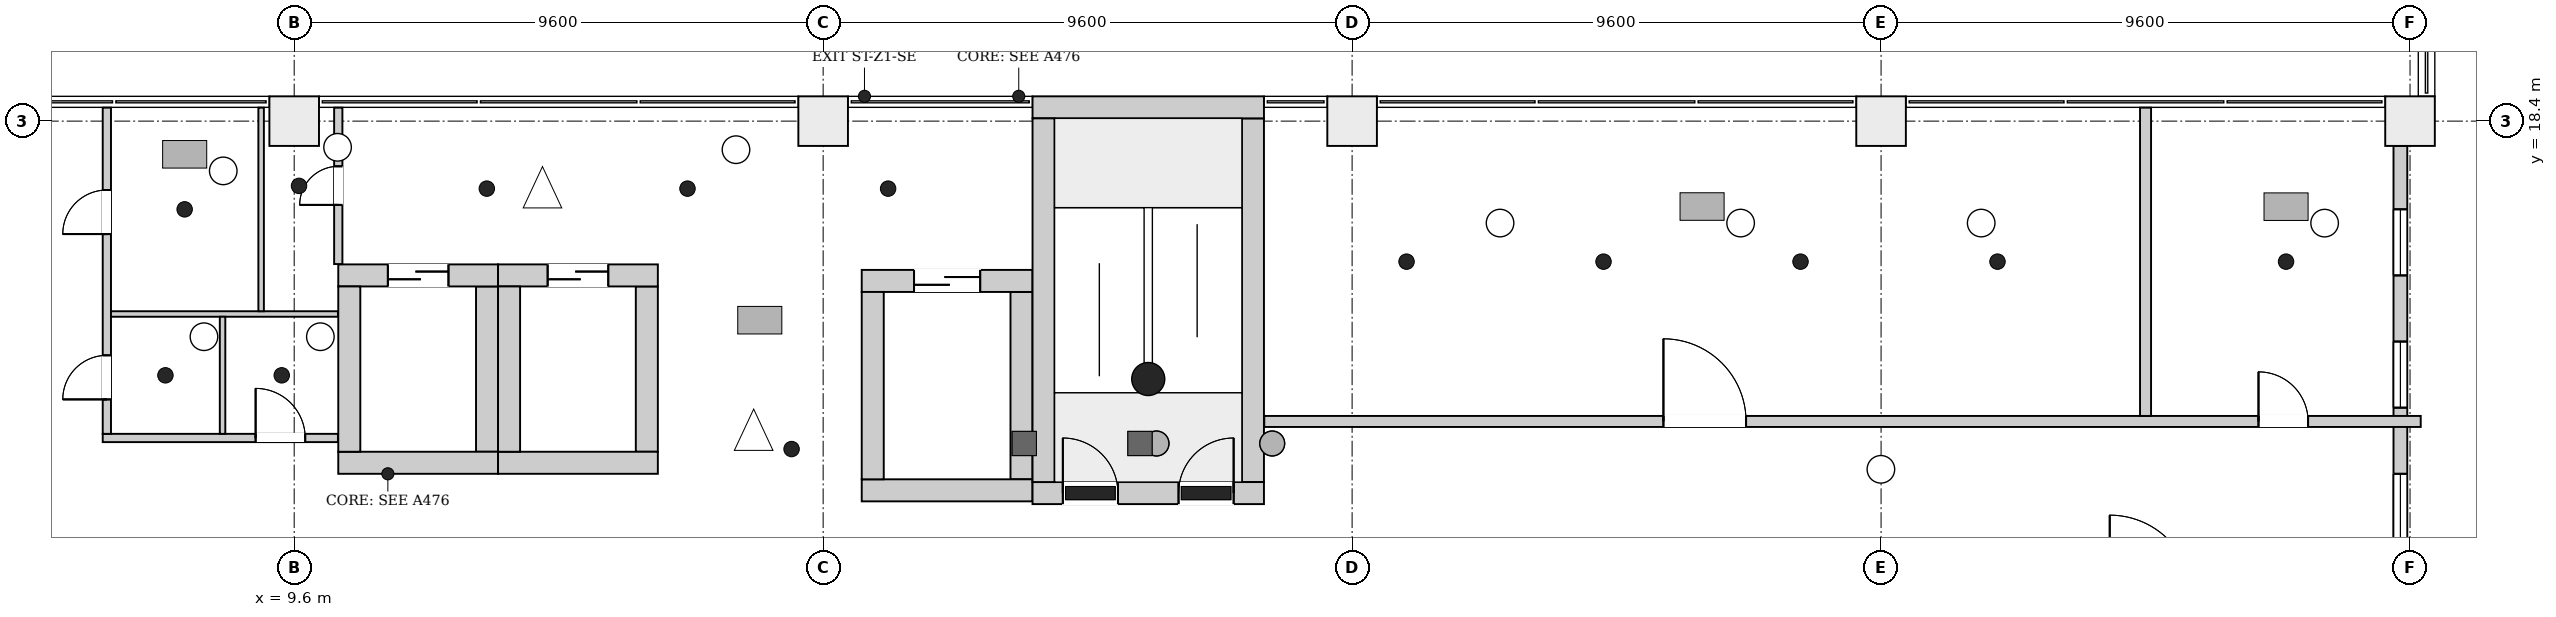
"""IFC4 building model, lengths in metres.
Left out: names, types, materials, properties, quantities, classifications, styles, units other than length and angle.
Written with IfcOpenShell. Run it as: python <this file> out.ifc"""

import sys

from ifc_helpers import new_model, si_unit, direction, frame, frame_2d, origin, origin_2d, place, context, subcontext, project, spatial, rectangle, extrude, element, fill, save


model = new_model("IFC4")
c1 = context("Model", 3, precision=1e-05, world=origin(), true_north=direction((0.0, 1.0)))
c2 = subcontext(c1, "Body", "Model", "MODEL_VIEW")
j1 = project(units=[si_unit("LENGTHUNIT", "METRE"), si_unit("PLANEANGLEUNIT", "RADIAN")], contexts=[c1])
p1 = place(None, origin())
s1 = spatial("IfcSite", under=j1, at=p1, CompositionType="ELEMENT")
p2 = place(p1, origin())
s2 = spatial("IfcBuilding", under=s1, at=p2, CompositionType="ELEMENT")
p3 = place(p2, frame((0.0, 0.0, 52.9)))
s3 = spatial("IfcBuildingStorey", under=s2, at=p3, CompositionType="ELEMENT", Elevation=52.9)
p4 = place(p3, frame((23.0, 11.65, 0.0), z_axis=(0.0, 0.0, 1.0), x_axis=(1.0, 0.0, 0.0)))
e1 = element("IfcWall", 1, at=p4, inside=s3, PredefinedType="SHEAR", context=c2, shape_type="SweptSolid", body=[
    extrude(rectangle(XDim=4.2, YDim=0.4, at=frame_2d((2.1, 0.0))), origin(), (0.0, 0.0, 1.0), 4.2),
])
p5 = place(p4, frame((0.55, 0.0, 0.0)))
e2 = element("IfcOpeningElement", 2, at=p5, cuts=e1, PredefinedType="OPENING", context=c2, shape_type="SweptSolid", body=[
    extrude(rectangle(XDim=1.0, YDim=2.1, at=frame_2d((0.5, 1.05))), frame((0.0, 0.21, 0.0), z_axis=(0.0, -1.0, 0.0), x_axis=(1.0, 0.0, 0.0)), (0.0, 0.0, 1.0), 0.42),
])
p6 = place(p4, frame((2.65, 0.0, 0.0)))
e3 = element("IfcOpeningElement", 3, at=p6, cuts=e1, PredefinedType="OPENING", context=c2, shape_type="SweptSolid", body=[
    extrude(rectangle(XDim=1.0, YDim=2.1, at=frame_2d((0.5, 1.05))), frame((0.0, 0.21, 0.0), z_axis=(0.0, -1.0, 0.0), x_axis=(1.0, 0.0, 0.0)), (0.0, 0.0, 1.0), 0.42),
])
p7 = place(p3, frame((23.0, 18.65, 0.0), z_axis=(0.0, 0.0, 1.0), x_axis=(1.0, 0.0, 0.0)))
e4 = element("IfcWall", 4, at=p7, inside=s3, PredefinedType="SHEAR", context=c2, shape_type="SweptSolid", body=[
    extrude(rectangle(XDim=4.2, YDim=0.4, at=frame_2d((2.1, 0.0))), origin(), (0.0, 0.0, 1.0), 4.2),
])
for number, where, z_axis, x_axis in (
    (5, (23.2, 11.85, 0.0), (0.0, 0.0, 1.0), (0.0, 1.0, 0.0)),
    (6, (27.0, 11.85, 0.0), (0.0, 0.0, 1.0), (0.0, 1.0, 0.0)),
):
    element("IfcWall", number, at=place(p3, frame(where, z_axis=z_axis, x_axis=x_axis)), inside=s3, PredefinedType="SHEAR", context=c2, shape_type="SweptSolid", body=[
        extrude(rectangle(XDim=6.6, YDim=0.4, at=frame_2d((3.3, 0.0))), origin(), (0.0, 0.0, 1.0), 4.2),
    ])
p8 = place(p3, frame((10.4, 12.2, 0.0), z_axis=(0.0, 0.0, 1.0), x_axis=(1.0, 0.0, 0.0)))
e7 = element("IfcWall", 7, at=p8, inside=s3, PredefinedType="SHEAR", context=c2, shape_type="SweptSolid", body=[
    extrude(rectangle(XDim=2.9, YDim=0.4, at=frame_2d((1.45, 0.0))), origin(), (0.0, 0.0, 1.0), 4.2),
])
p9 = place(p3, frame((10.4, 15.6, 0.0), z_axis=(0.0, 0.0, 1.0), x_axis=(1.0, 0.0, 0.0)))
e8 = element("IfcWall", 8, at=p9, inside=s3, PredefinedType="SHEAR", context=c2, shape_type="SweptSolid", body=[
    extrude(rectangle(XDim=2.9, YDim=0.4, at=frame_2d((1.45, 0.0))), origin(), (0.0, 0.0, 1.0), 4.2),
])
p10 = place(p9, frame((0.9, 0.0, 0.0)))
e9 = element("IfcOpeningElement", 9, at=p10, cuts=e8, PredefinedType="OPENING", context=c2, shape_type="SweptSolid", body=[
    extrude(rectangle(XDim=1.1, YDim=2.1, at=frame_2d((0.55, 1.05))), frame((0.0, 0.21, 0.0), z_axis=(0.0, -1.0, 0.0), x_axis=(1.0, 0.0, 0.0)), (0.0, 0.0, 1.0), 0.42),
])
for number, where, z_axis, x_axis in (
    (10, (10.6, 12.4, 0.0), (0.0, 0.0, 1.0), (0.0, 1.0, 0.0)),
    (11, (13.1, 12.4, 0.0), (0.0, 0.0, 1.0), (0.0, 1.0, 0.0)),
):
    element("IfcWall", number, at=place(p3, frame(where, z_axis=z_axis, x_axis=x_axis)), inside=s3, PredefinedType="SHEAR", context=c2, shape_type="SweptSolid", body=[
        extrude(rectangle(XDim=3.0, YDim=0.4, at=frame_2d((1.5, 0.0))), origin(), (0.0, 0.0, 1.0), 4.2),
    ])
p11 = place(p3, frame((13.3, 12.2, 0.0), z_axis=(0.0, 0.0, 1.0), x_axis=(1.0, 0.0, 0.0)))
e12 = element("IfcWall", 12, at=p11, inside=s3, PredefinedType="SHEAR", context=c2, shape_type="SweptSolid", body=[
    extrude(rectangle(XDim=2.9, YDim=0.4, at=frame_2d((1.45, 0.0))), origin(), (0.0, 0.0, 1.0), 4.2),
])
p12 = place(p3, frame((13.3, 15.6, 0.0), z_axis=(0.0, 0.0, 1.0), x_axis=(1.0, 0.0, 0.0)))
e13 = element("IfcWall", 13, at=p12, inside=s3, PredefinedType="SHEAR", context=c2, shape_type="SweptSolid", body=[
    extrude(rectangle(XDim=2.9, YDim=0.4, at=frame_2d((1.45, 0.0))), origin(), (0.0, 0.0, 1.0), 4.2),
])
p13 = place(p12, frame((0.9, 0.0, 0.0)))
e14 = element("IfcOpeningElement", 14, at=p13, cuts=e13, PredefinedType="OPENING", context=c2, shape_type="SweptSolid", body=[
    extrude(rectangle(XDim=1.1, YDim=2.1, at=frame_2d((0.55, 1.05))), frame((0.0, 0.21, 0.0), z_axis=(0.0, -1.0, 0.0), x_axis=(1.0, 0.0, 0.0)), (0.0, 0.0, 1.0), 0.42),
])
for number, where, z_axis, x_axis in (
    (15, (13.5, 12.4, 0.0), (0.0, 0.0, 1.0), (0.0, 1.0, 0.0)),
    (16, (16.0, 12.4, 0.0), (0.0, 0.0, 1.0), (0.0, 1.0, 0.0)),
):
    element("IfcWall", number, at=place(p3, frame(where, z_axis=z_axis, x_axis=x_axis)), inside=s3, PredefinedType="SHEAR", context=c2, shape_type="SweptSolid", body=[
        extrude(rectangle(XDim=3.0, YDim=0.4, at=frame_2d((1.5, 0.0))), origin(), (0.0, 0.0, 1.0), 4.2),
    ])
p14 = place(p3, frame((19.9, 11.7, 0.0), z_axis=(0.0, 0.0, 1.0), x_axis=(1.0, 0.0, 0.0)))
e17 = element("IfcWall", 17, at=p14, inside=s3, PredefinedType="SHEAR", context=c2, shape_type="SweptSolid", body=[
    extrude(rectangle(XDim=3.1, YDim=0.4, at=frame_2d((1.55, 0.0))), origin(), (0.0, 0.0, 1.0), 4.2),
])
p15 = place(p3, frame((19.9, 15.5, 0.0), z_axis=(0.0, 0.0, 1.0), x_axis=(1.0, 0.0, 0.0)))
e18 = element("IfcWall", 18, at=p15, inside=s3, PredefinedType="SHEAR", context=c2, shape_type="SweptSolid", body=[
    extrude(rectangle(XDim=3.1, YDim=0.4, at=frame_2d((1.55, 0.0))), origin(), (0.0, 0.0, 1.0), 4.2),
])
p16 = place(p15, frame((0.95, 0.0, 0.0)))
e19 = element("IfcOpeningElement", 19, at=p16, cuts=e18, PredefinedType="OPENING", context=c2, shape_type="SweptSolid", body=[
    extrude(rectangle(XDim=1.2, YDim=2.1, at=frame_2d((0.6, 1.05))), frame((0.0, 0.21, 0.0), z_axis=(0.0, -1.0, 0.0), x_axis=(1.0, 0.0, 0.0)), (0.0, 0.0, 1.0), 0.42),
])
for number, where, z_axis, x_axis in (
    (20, (20.1, 11.9, 0.0), (0.0, 0.0, 1.0), (0.0, 1.0, 0.0)),
    (21, (22.8, 11.9, 0.0), (0.0, 0.0, 1.0), (0.0, 1.0, 0.0)),
):
    element("IfcWall", number, at=place(p3, frame(where, z_axis=z_axis, x_axis=x_axis)), inside=s3, PredefinedType="SHEAR", context=c2, shape_type="SweptSolid", body=[
        extrude(rectangle(XDim=3.4, YDim=0.4, at=frame_2d((1.7, 0.0))), origin(), (0.0, 0.0, 1.0), 4.2),
    ])
for number, where, z_axis, x_axis in (
    (22, (9.6, 18.4, 0.0), (0.0, 0.0, 1.0), (1.0, 0.0, 0.0)),
    (23, (19.2, 18.4, 0.0), (0.0, 0.0, 1.0), (1.0, 0.0, 0.0)),
    (24, (28.8, 18.4, 0.0), (0.0, 0.0, 1.0), (1.0, 0.0, 0.0)),
    (25, (38.4, 18.4, 0.0), (0.0, 0.0, 1.0), (1.0, 0.0, 0.0)),
    (26, (48.0, 18.4, 0.0), (0.0, 0.0, 1.0), (1.0, 0.0, 0.0)),
):
    element("IfcColumn", number, at=place(p3, frame(where, z_axis=z_axis, x_axis=x_axis)), inside=s3, PredefinedType="COLUMN", context=c2, shape_type="SweptSolid", body=[
        extrude(rectangle(XDim=0.9, YDim=0.9, at=origin_2d()), origin(), (0.0, 0.0, 1.0), 4.2),
    ])
p17 = place(p3, frame((47.825, 9.65, 0.0), z_axis=(0.0, 0.0, 1.0), x_axis=(0.0, 1.0, 0.0)))
e27 = element("IfcWall", 27, at=p17, inside=s3, PredefinedType="ELEMENTEDWALL", context=c2, shape_type="SweptSolid", body=[
    extrude(rectangle(XDim=8.3, YDim=0.25, at=frame_2d((4.15, 0.0))), origin(), (0.0, 0.0, 1.0), 3.3),
])
p18 = place(p17, frame((1.15, 0.0, 0.6)))
e28 = element("IfcOpeningElement", 28, at=p18, cuts=e27, PredefinedType="OPENING", context=c2, shape_type="SweptSolid", body=[
    extrude(rectangle(XDim=1.2, YDim=2.6, at=frame_2d((0.6, 1.3))), frame((0.0, 0.135, 0.0), z_axis=(0.0, -1.0, 0.0), x_axis=(1.0, 0.0, 0.0)), (0.0, 0.0, 1.0), 0.27),
])
p19 = place(p17, frame((3.55, 0.0, 0.6)))
e29 = element("IfcOpeningElement", 29, at=p19, cuts=e27, PredefinedType="OPENING", context=c2, shape_type="SweptSolid", body=[
    extrude(rectangle(XDim=1.2, YDim=2.6, at=frame_2d((0.6, 1.3))), frame((0.0, 0.135, 0.0), z_axis=(0.0, -1.0, 0.0), x_axis=(1.0, 0.0, 0.0)), (0.0, 0.0, 1.0), 0.27),
])
p20 = place(p17, frame((5.95, 0.0, 0.6)))
e30 = element("IfcOpeningElement", 30, at=p20, cuts=e27, PredefinedType="OPENING", context=c2, shape_type="SweptSolid", body=[
    extrude(rectangle(XDim=1.2, YDim=2.6, at=frame_2d((0.6, 1.3))), frame((0.0, 0.135, 0.0), z_axis=(0.0, -1.0, 0.0), x_axis=(1.0, 0.0, 0.0)), (0.0, 0.0, 1.0), 0.27),
])
p21 = place(p3, frame((6.125, 12.65, 0.0), z_axis=(0.0, 0.0, 1.0), x_axis=(1.0, 0.0, 0.0)))
e31 = element("IfcWall", 31, at=p21, inside=s3, PredefinedType="PARTITIONING", context=c2, shape_type="SweptSolid", body=[
    extrude(rectangle(XDim=4.269, YDim=0.15, at=frame_2d((2.135, 0.0))), origin(), (0.0, 0.0, 1.0), 3.9),
])
p22 = place(p21, frame((2.775, 0.0, 0.0)))
e32 = element("IfcOpeningElement", 32, at=p22, cuts=e31, PredefinedType="OPENING", context=c2, shape_type="SweptSolid", body=[
    extrude(rectangle(XDim=0.9, YDim=2.1, at=frame_2d((0.45, 1.05))), frame((0.0, 0.085, 0.0), z_axis=(0.0, -1.0, 0.0), x_axis=(1.0, 0.0, 0.0)), (0.0, 0.0, 1.0), 0.17),
])
p23 = place(p3, frame((6.2, 12.725, 0.0), z_axis=(0.0, 0.0, 1.0), x_axis=(0.0, 1.0, 0.0)))
e33 = element("IfcWall", 33, at=p23, inside=s3, PredefinedType="PARTITIONING", context=c2, shape_type="SweptSolid", body=[
    extrude(rectangle(XDim=5.919, YDim=0.15, at=frame_2d((2.959, 0.0))), origin(), (0.0, 0.0, 1.0), 3.9),
])
p24 = place(p23, frame((0.625, 0.0, 0.0)))
e34 = element("IfcOpeningElement", 34, at=p24, cuts=e33, PredefinedType="OPENING", context=c2, shape_type="SweptSolid", body=[
    extrude(rectangle(XDim=0.8, YDim=2.1, at=frame_2d((0.4, 1.05))), frame((0.0, 0.085, 0.0), z_axis=(0.0, -1.0, 0.0), x_axis=(1.0, 0.0, 0.0)), (0.0, 0.0, 1.0), 0.17),
])
p25 = place(p23, frame((3.625, 0.0, 0.0)))
e35 = element("IfcOpeningElement", 35, at=p25, cuts=e33, PredefinedType="OPENING", context=c2, shape_type="SweptSolid", body=[
    extrude(rectangle(XDim=0.8, YDim=2.1, at=frame_2d((0.4, 1.05))), frame((0.0, 0.085, 0.0), z_axis=(0.0, -1.0, 0.0), x_axis=(1.0, 0.0, 0.0)), (0.0, 0.0, 1.0), 0.17),
])
p26 = place(p3, frame((6.275, 14.9, 0.0), z_axis=(0.0, 0.0, 1.0), x_axis=(1.0, 0.0, 0.0)))
e36 = element("IfcWall", 36, at=p26, inside=s3, PredefinedType="PARTITIONING", context=c2, shape_type="SweptSolid", body=[
    extrude(rectangle(XDim=4.119, YDim=0.1, at=frame_2d((2.06, 0.0))), origin(), (0.0, 0.0, 1.0), 3.9),
])
p27 = place(p3, frame((8.3, 12.725, 0.0), z_axis=(0.0, 0.0, 1.0), x_axis=(0.0, 1.0, 0.0)))
e37 = element("IfcWall", 37, at=p27, inside=s3, PredefinedType="PARTITIONING", context=c2, shape_type="SweptSolid", body=[
    extrude(rectangle(XDim=2.125, YDim=0.1, at=frame_2d((1.062, 0.0))), origin(), (0.0, 0.0, 1.0), 3.9),
])
p28 = place(p3, frame((9.0, 14.95, 0.0), z_axis=(0.0, 0.0, 1.0), x_axis=(0.0, 1.0, 0.0)))
e38 = element("IfcWall", 38, at=p28, inside=s3, PredefinedType="PARTITIONING", context=c2, shape_type="SweptSolid", body=[
    extrude(rectangle(XDim=3.694, YDim=0.1, at=frame_2d((1.847, 0.0))), origin(), (0.0, 0.0, 1.0), 3.9),
])
p29 = place(p3, frame((10.4, 15.806, 0.0), z_axis=(0.0, 0.0, 1.0), x_axis=(0.0, 1.0, 0.0)))
e39 = element("IfcWall", 39, at=p29, inside=s3, PredefinedType="PARTITIONING", context=c2, shape_type="SweptSolid", body=[
    extrude(rectangle(XDim=2.838, YDim=0.15, at=frame_2d((1.419, 0.0))), origin(), (0.0, 0.0, 1.0), 3.9),
])
p30 = place(p29, frame((1.074, 0.0, 0.0)))
e40 = element("IfcOpeningElement", 40, at=p30, cuts=e39, PredefinedType="OPENING", context=c2, shape_type="SweptSolid", body=[
    extrude(rectangle(XDim=0.7, YDim=2.1, at=frame_2d((0.35, 1.05))), frame((0.0, 0.085, 0.0), z_axis=(0.0, -1.0, 0.0), x_axis=(1.0, 0.0, 0.0)), (0.0, 0.0, 1.0), 0.17),
])
p31 = place(p3, frame((27.206, 12.95, 0.0), z_axis=(0.0, 0.0, 1.0), x_axis=(1.0, 0.0, 0.0)))
e41 = element("IfcWall", 41, at=p31, inside=s3, PredefinedType="PARTITIONING", context=c2, shape_type="SweptSolid", body=[
    extrude(rectangle(XDim=20.988, YDim=0.2, at=frame_2d((10.494, 0.0))), origin(), (0.0, 0.0, 1.0), 3.9),
])
p32 = place(p31, frame((7.244, 0.0, 0.0)))
e42 = element("IfcOpeningElement", 42, at=p32, cuts=e41, PredefinedType="OPENING", context=c2, shape_type="SweptSolid", body=[
    extrude(rectangle(XDim=1.5, YDim=2.1, at=frame_2d((0.75, 1.05))), frame((0.0, 0.11, 0.0), z_axis=(0.0, -1.0, 0.0), x_axis=(1.0, 0.0, 0.0)), (0.0, 0.0, 1.0), 0.22),
])
p33 = place(p31, frame((18.044, 0.0, 0.0)))
e43 = element("IfcOpeningElement", 43, at=p33, cuts=e41, PredefinedType="OPENING", context=c2, shape_type="SweptSolid", body=[
    extrude(rectangle(XDim=0.9, YDim=2.1, at=frame_2d((0.45, 1.05))), frame((0.0, 0.11, 0.0), z_axis=(0.0, -1.0, 0.0), x_axis=(1.0, 0.0, 0.0)), (0.0, 0.0, 1.0), 0.22),
])
p34 = place(p3, frame((43.2, 13.05, 0.0), z_axis=(0.0, 0.0, 1.0), x_axis=(0.0, 1.0, 0.0)))
e44 = element("IfcWall", 44, at=p34, inside=s3, PredefinedType="PARTITIONING", context=c2, shape_type="SweptSolid", body=[
    extrude(rectangle(XDim=5.594, YDim=0.2, at=frame_2d((2.797, 0.0))), origin(), (0.0, 0.0, 1.0), 3.9),
])
p35 = place(p18, origin())
e45 = element("IfcWindow", 45, at=p35, inside=s3, PartitioningType="SINGLE_PANEL", PredefinedType="WINDOW", context=c2, shape_type="SweptSolid", body=[
    extrude(rectangle(XDim=1.2, YDim=2.6, at=frame_2d((0.6, 1.3))), frame((0.0, 0.03, 0.0), z_axis=(0.0, -1.0, 0.0), x_axis=(1.0, 0.0, 0.0)), (0.0, 0.0, 1.0), 0.06),
])
fill(e28, e45)
p36 = place(p19, origin())
e46 = element("IfcWindow", 46, at=p36, inside=s3, PartitioningType="SINGLE_PANEL", PredefinedType="WINDOW", context=c2, shape_type="SweptSolid", body=[
    extrude(rectangle(XDim=1.2, YDim=2.6, at=frame_2d((0.6, 1.3))), frame((0.0, 0.03, 0.0), z_axis=(0.0, -1.0, 0.0), x_axis=(1.0, 0.0, 0.0)), (0.0, 0.0, 1.0), 0.06),
])
fill(e29, e46)
p37 = place(p20, origin())
e47 = element("IfcWindow", 47, at=p37, inside=s3, PartitioningType="SINGLE_PANEL", PredefinedType="WINDOW", context=c2, shape_type="SweptSolid", body=[
    extrude(rectangle(XDim=1.2, YDim=2.6, at=frame_2d((0.6, 1.3))), frame((0.0, 0.03, 0.0), z_axis=(0.0, -1.0, 0.0), x_axis=(1.0, 0.0, 0.0)), (0.0, 0.0, 1.0), 0.06),
])
fill(e30, e47)
p38 = place(p5, origin())
e48 = element("IfcDoor", 48, at=p38, inside=s3, OperationType="SINGLE_SWING_RIGHT", PredefinedType="DOOR", context=c2, shape_type="SweptSolid", body=[
    extrude(rectangle(XDim=1.0, YDim=2.1, at=frame_2d((0.5, 1.05))), frame((0.0, 0.025, 0.0), z_axis=(0.0, -1.0, 0.0), x_axis=(1.0, 0.0, 0.0)), (0.0, 0.0, 1.0), 0.05),
])
fill(e2, e48)
p39 = place(p6, origin())
e49 = element("IfcDoor", 49, at=p39, inside=s3, OperationType="SINGLE_SWING_LEFT", PredefinedType="DOOR", context=c2, shape_type="SweptSolid", body=[
    extrude(rectangle(XDim=1.0, YDim=2.1, at=frame_2d((0.5, 1.05))), frame((0.0, 0.025, 0.0), z_axis=(0.0, -1.0, 0.0), x_axis=(1.0, 0.0, 0.0)), (0.0, 0.0, 1.0), 0.05),
])
fill(e3, e49)
p40 = place(p10, origin())
e50 = element("IfcDoor", 50, at=p40, inside=s3, OperationType="DOUBLE_DOOR_SLIDING", PredefinedType="DOOR", context=c2, shape_type="SweptSolid", body=[
    extrude(rectangle(XDim=1.1, YDim=2.1, at=frame_2d((0.55, 1.05))), frame((0.0, 0.025, 0.0), z_axis=(0.0, -1.0, 0.0), x_axis=(1.0, 0.0, 0.0)), (0.0, 0.0, 1.0), 0.05),
])
fill(e9, e50)
p41 = place(p13, origin())
e51 = element("IfcDoor", 51, at=p41, inside=s3, OperationType="DOUBLE_DOOR_SLIDING", PredefinedType="DOOR", context=c2, shape_type="SweptSolid", body=[
    extrude(rectangle(XDim=1.1, YDim=2.1, at=frame_2d((0.55, 1.05))), frame((0.0, 0.025, 0.0), z_axis=(0.0, -1.0, 0.0), x_axis=(1.0, 0.0, 0.0)), (0.0, 0.0, 1.0), 0.05),
])
fill(e14, e51)
p42 = place(p16, origin())
e52 = element("IfcDoor", 52, at=p42, inside=s3, OperationType="DOUBLE_DOOR_SLIDING", PredefinedType="DOOR", context=c2, shape_type="SweptSolid", body=[
    extrude(rectangle(XDim=1.2, YDim=2.1, at=frame_2d((0.6, 1.05))), frame((0.0, 0.025, 0.0), z_axis=(0.0, -1.0, 0.0), x_axis=(1.0, 0.0, 0.0)), (0.0, 0.0, 1.0), 0.05),
])
fill(e19, e52)
p43 = place(p24, origin())
e53 = element("IfcDoor", 53, at=p43, inside=s3, OperationType="SINGLE_SWING_LEFT", PredefinedType="DOOR", context=c2, shape_type="SweptSolid", body=[
    extrude(rectangle(XDim=0.8, YDim=2.1, at=frame_2d((0.4, 1.05))), frame((0.0, 0.025, 0.0), z_axis=(0.0, -1.0, 0.0), x_axis=(1.0, 0.0, 0.0)), (0.0, 0.0, 1.0), 0.05),
])
fill(e34, e53)
p44 = place(p22, origin())
e54 = element("IfcDoor", 54, at=p44, inside=s3, OperationType="SINGLE_SWING_RIGHT", PredefinedType="DOOR", context=c2, shape_type="SweptSolid", body=[
    extrude(rectangle(XDim=0.9, YDim=2.1, at=frame_2d((0.45, 1.05))), frame((0.0, 0.025, 0.0), z_axis=(0.0, -1.0, 0.0), x_axis=(1.0, 0.0, 0.0)), (0.0, 0.0, 1.0), 0.05),
])
fill(e32, e54)
p45 = place(p25, origin())
e55 = element("IfcDoor", 55, at=p45, inside=s3, OperationType="SINGLE_SWING_LEFT", PredefinedType="DOOR", context=c2, shape_type="SweptSolid", body=[
    extrude(rectangle(XDim=0.8, YDim=2.1, at=frame_2d((0.4, 1.05))), frame((0.0, 0.025, 0.0), z_axis=(0.0, -1.0, 0.0), x_axis=(1.0, 0.0, 0.0)), (0.0, 0.0, 1.0), 0.05),
])
fill(e35, e55)
p46 = place(p30, origin())
e56 = element("IfcDoor", 56, at=p46, inside=s3, OperationType="SINGLE_SWING_LEFT", PredefinedType="DOOR", context=c2, shape_type="SweptSolid", body=[
    extrude(rectangle(XDim=0.7, YDim=2.1, at=frame_2d((0.35, 1.05))), frame((0.0, 0.025, 0.0), z_axis=(0.0, -1.0, 0.0), x_axis=(1.0, 0.0, 0.0)), (0.0, 0.0, 1.0), 0.05),
])
fill(e40, e56)
p47 = place(p32, origin())
e57 = element("IfcDoor", 57, at=p47, inside=s3, OperationType="DOUBLE_DOOR_SINGLE_SWING", PredefinedType="DOOR", context=c2, shape_type="SweptSolid", body=[
    extrude(rectangle(XDim=1.5, YDim=2.1, at=frame_2d((0.75, 1.05))), frame((0.0, 0.025, 0.0), z_axis=(0.0, -1.0, 0.0), x_axis=(1.0, 0.0, 0.0)), (0.0, 0.0, 1.0), 0.05),
])
fill(e42, e57)
p48 = place(p33, origin())
e58 = element("IfcDoor", 58, at=p48, inside=s3, OperationType="SINGLE_SWING_RIGHT", PredefinedType="DOOR", context=c2, shape_type="SweptSolid", body=[
    extrude(rectangle(XDim=0.9, YDim=2.1, at=frame_2d((0.45, 1.05))), frame((0.0, 0.025, 0.0), z_axis=(0.0, -1.0, 0.0), x_axis=(1.0, 0.0, 0.0)), (0.0, 0.0, 1.0), 0.05),
])
fill(e43, e58)
save(model, sys.argv[1])
